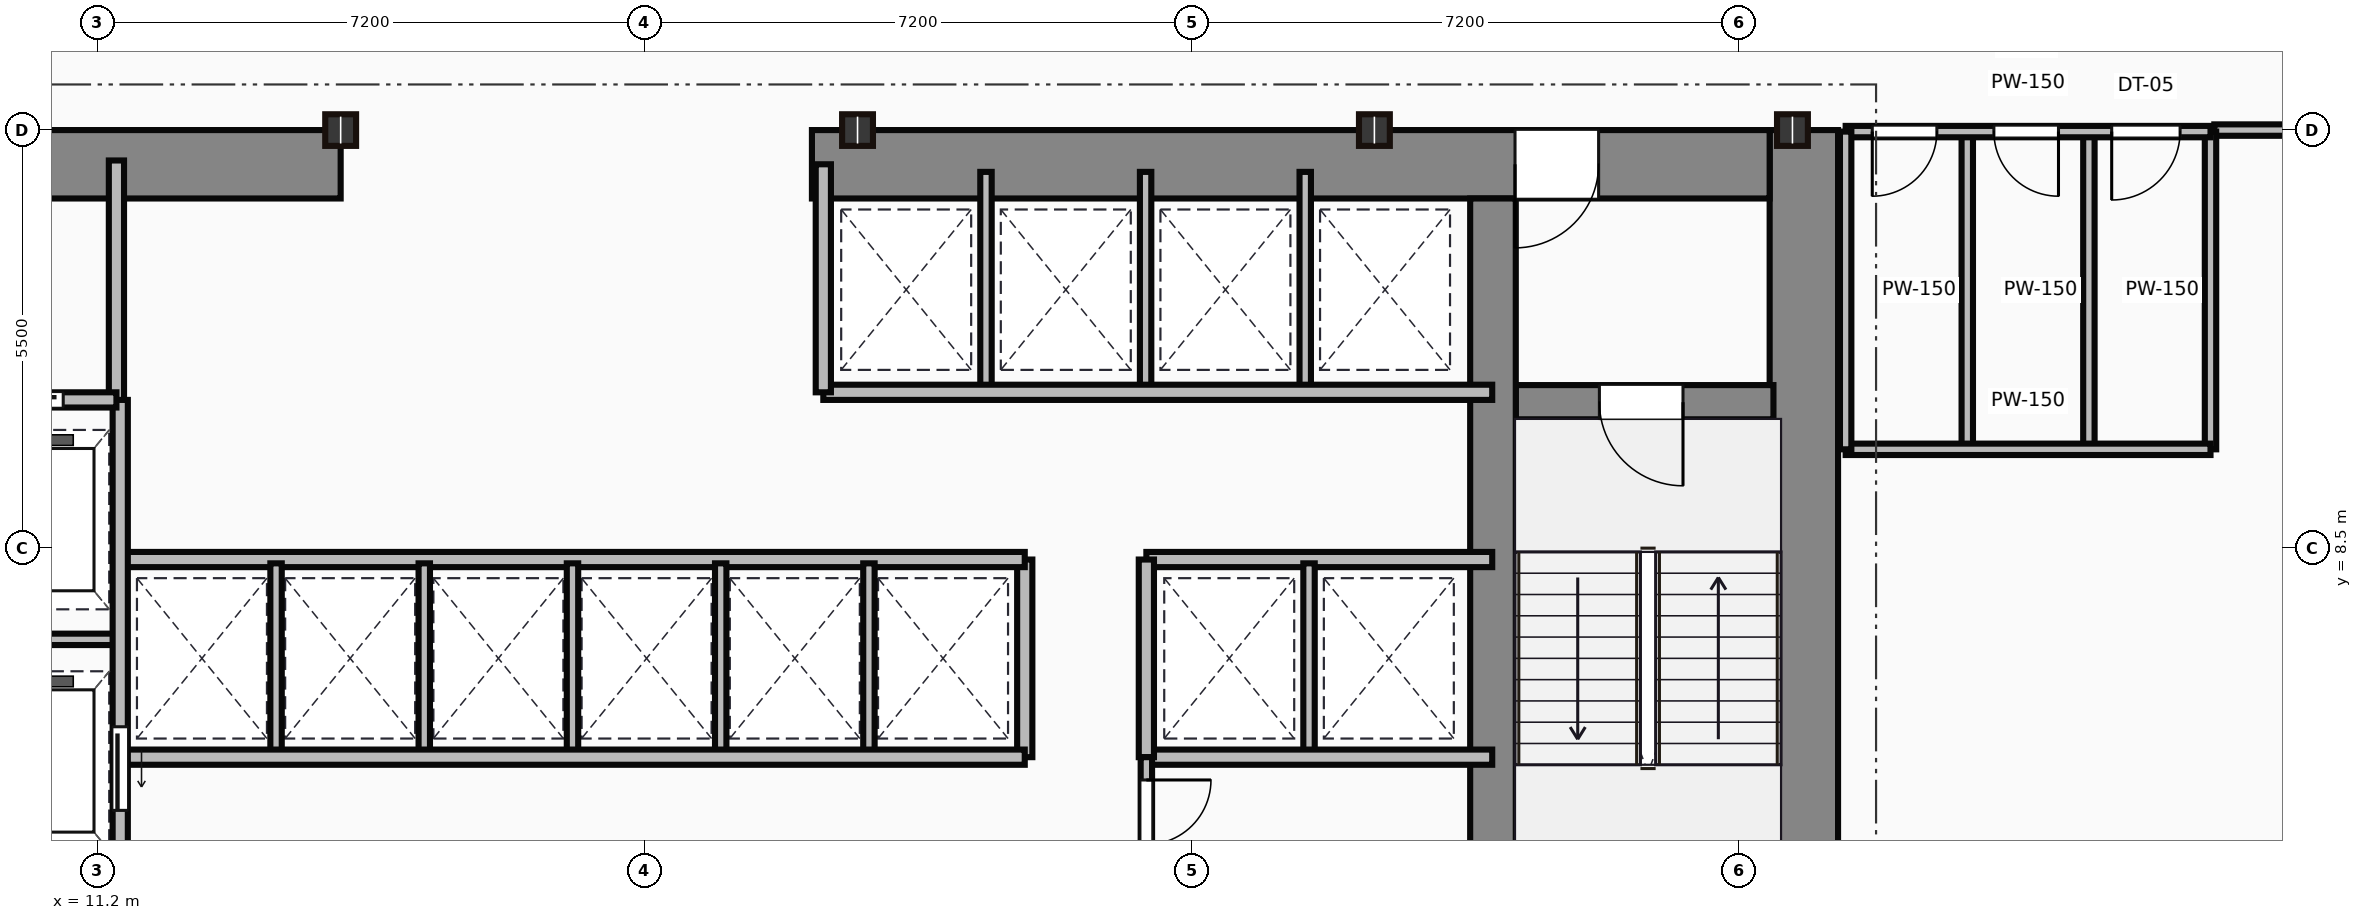
"""IFC4 building model, lengths in metres.
Left out: names, types, materials, properties, quantities, classifications, styles, units other than length and angle.
Written with IfcOpenShell. Run it as: python <this file> out.ifc"""

import sys

from ifc_helpers import new_model, si_unit, direction, frame, frame_2d, origin, origin_2d, place, context, subcontext, project, spatial, rectangle, i_section, extrude, source, transform, mapped, element, fill, save


model = new_model("IFC4")
c1 = context("Model", 3, precision=1e-05, world=origin(), true_north=direction((0.0, 1.0)))
c2 = subcontext(c1, "Body", "Model", "MODEL_VIEW")
j1 = project(units=[si_unit("LENGTHUNIT", "METRE"), si_unit("PLANEANGLEUNIT", "RADIAN")], contexts=[c1])
p1 = place(None, origin())
s1 = spatial("IfcSite", under=j1, at=p1, CompositionType="ELEMENT")
p2 = place(p1, origin())
s2 = spatial("IfcBuilding", under=s1, at=p2, CompositionType="ELEMENT")
p3 = place(p2, frame((0.0, 0.0, 43.45)))
s3 = spatial("IfcBuildingStorey", under=s2, at=p3, CompositionType="ELEMENT", Elevation=43.45)
m1 = source(origin(), c2, "Body", "SweptSolid", [
    extrude(rectangle(XDim=13.1, YDim=0.9, at=frame_2d((6.55, 0.0))), origin(), (0.0, 0.0, 1.0), 3.65),
])
p4 = place(p3, frame((33.65, 0.9, 0.0), z_axis=(0.0, 0.0, 1.0), x_axis=(0.0, 1.0, 0.0)))
e1 = element("IfcWall", 1, at=p4, inside=s3, PredefinedType="SHEAR", context=c2, shape_type="MappedRepresentation", body=[
    mapped(m1, transform((0.0, 0.0, 0.0))),
])
m2 = source(origin(), c2, "Body", "SweptSolid", [
    extrude(rectangle(XDim=9.1, YDim=0.9, at=frame_2d((4.55, 0.0))), origin(), (0.0, 0.0, 1.0), 3.65),
])
p5 = place(p3, frame((5.3, 13.55, 0.0), z_axis=(0.0, 0.0, 1.0), x_axis=(1.0, 0.0, 0.0)))
e2 = element("IfcWall", 2, at=p5, inside=s3, PredefinedType="SHEAR", context=c2, shape_type="MappedRepresentation", body=[
    mapped(m2, transform((0.0, 0.0, 0.0))),
])
p6 = place(p5, frame((4.1, 0.0, 0.0)))
e3 = element("IfcOpeningElement", 3, at=p6, cuts=e2, PredefinedType="OPENING", context=c2, shape_type="SweptSolid", body=[
    extrude(rectangle(XDim=1.1, YDim=2.15, at=frame_2d((0.55, 1.075))), frame((0.0, 0.46, 0.0), z_axis=(0.0, -1.0, 0.0), x_axis=(1.0, 0.0, 0.0)), (0.0, 0.0, 1.0), 0.92),
])
m3 = source(origin(), c2, "Body", "SweptSolid", [
    extrude(rectangle(XDim=12.6, YDim=0.9, at=frame_2d((6.3, 0.0))), origin(), (0.0, 0.0, 1.0), 3.65),
])
p7 = place(p3, frame((20.6, 13.55, 0.0), z_axis=(0.0, 0.0, 1.0), x_axis=(1.0, 0.0, 0.0)))
e4 = element("IfcWall", 4, at=p7, inside=s3, PredefinedType="SHEAR", context=c2, shape_type="MappedRepresentation", body=[
    mapped(m3, transform((0.0, 0.0, 0.0))),
])
p8 = place(p7, frame((9.25, 0.0, 0.0)))
e5 = element("IfcOpeningElement", 5, at=p8, cuts=e4, PredefinedType="OPENING", context=c2, shape_type="SweptSolid", body=[
    extrude(rectangle(XDim=1.1, YDim=2.15, at=frame_2d((0.55, 1.075))), frame((0.0, 0.46, 0.0), z_axis=(0.0, -1.0, 0.0), x_axis=(1.0, 0.0, 0.0)), (0.0, 0.0, 1.0), 0.92),
])
m4 = source(origin(), c2, "Body", "SweptSolid", [
    extrude(rectangle(XDim=12.2, YDim=0.6, at=frame_2d((6.1, 0.0))), origin(), (0.0, 0.0, 1.0), 3.65),
])
p9 = place(p3, frame((29.56, 0.9, 0.0), z_axis=(0.0, 0.0, 1.0), x_axis=(0.0, 1.0, 0.0)))
e6 = element("IfcWall", 6, at=p9, inside=s3, PredefinedType="SHEAR", context=c2, shape_type="MappedRepresentation", body=[
    mapped(m4, transform((0.0, 0.0, 0.0))),
])
m5 = source(origin(), c2, "Body", "SweptSolid", [
    extrude(rectangle(XDim=3.39, YDim=0.45, at=frame_2d((1.695, 0.0))), origin(), (0.0, 0.0, 1.0), 3.65),
])
p10 = place(p3, frame((29.86, 10.42, 0.0), z_axis=(0.0, 0.0, 1.0), x_axis=(1.0, 0.0, 0.0)))
e7 = element("IfcWall", 7, at=p10, inside=s3, PredefinedType="SHEAR", context=c2, shape_type="MappedRepresentation", body=[
    mapped(m5, transform((0.0, 0.0, 0.0))),
])
p11 = place(p10, frame((1.1, 0.0, 0.0)))
e8 = element("IfcOpeningElement", 8, at=p11, cuts=e7, PredefinedType="OPENING", context=c2, shape_type="SweptSolid", body=[
    extrude(rectangle(XDim=1.1, YDim=2.15, at=frame_2d((0.55, 1.075))), frame((0.0, 0.235, 0.0), z_axis=(0.0, -1.0, 0.0), x_axis=(1.0, 0.0, 0.0)), (0.0, 0.0, 1.0), 0.47),
])
m6 = source(origin(), c2, "Body", "SweptSolid", [
    extrude(i_section(OverallWidth=0.406, OverallDepth=0.416, WebThickness=0.03, FlangeThickness=0.048, at=origin_2d()), origin(), (0.0, 0.0, 1.0), 3.65),
])
for number, where, z_axis, x_axis in (
    (9, (14.4, 14.0, 0.0), (0.0, 0.0, 1.0), (1.0, 0.0, 0.0)),
    (10, (21.2, 14.0, 0.0), (0.0, 0.0, 1.0), (1.0, 0.0, 0.0)),
    (11, (28.0, 14.0, 0.0), (0.0, 0.0, 1.0), (1.0, 0.0, 0.0)),
    (12, (33.5, 14.0, 0.0), (0.0, 0.0, 1.0), (1.0, 0.0, 0.0)),
):
    element("IfcColumn", number, at=place(p3, frame(where, z_axis=z_axis, x_axis=x_axis)), inside=s3, PredefinedType="COLUMN", context=c2, shape_type="MappedRepresentation", body=[
        mapped(m6, transform((0.0, 0.0, 0.0))),
    ])
m7 = source(origin(), c2, "Body", "SweptSolid", [
    extrude(rectangle(XDim=3.18, YDim=0.2, at=frame_2d((1.59, 0.0))), origin(), (0.0, 0.0, 1.0), 3.4),
])
p12 = place(p3, frame((11.45, 10.42, 0.0), z_axis=(0.0, 0.0, 1.0), x_axis=(0.0, 1.0, 0.0)))
e13 = element("IfcWall", 13, at=p12, inside=s3, PredefinedType="PARTITIONING", context=c2, shape_type="MappedRepresentation", body=[
    mapped(m7, transform((0.0, 0.0, 0.0))),
])
m8 = source(origin(), c2, "Body", "SweptSolid", [
    extrude(rectangle(XDim=2.35, YDim=0.2, at=frame_2d((1.175, 0.0))), origin(), (0.0, 0.0, 1.0), 3.4),
])
p13 = place(p3, frame((9.1, 10.45, 0.0), z_axis=(0.0, 0.0, 1.0), x_axis=(1.0, 0.0, 0.0)))
e14 = element("IfcWall", 14, at=p13, inside=s3, PredefinedType="PARTITIONING", context=c2, shape_type="MappedRepresentation", body=[
    mapped(m8, transform((0.0, 0.0, 0.0))),
])
p14 = place(p13, frame((0.55, 0.0, 0.0)))
e15 = element("IfcOpeningElement", 15, at=p14, cuts=e14, PredefinedType="OPENING", context=c2, shape_type="SweptSolid", body=[
    extrude(rectangle(XDim=1.1, YDim=2.15, at=frame_2d((0.55, 1.075))), frame((0.0, 0.11, 0.0), z_axis=(0.0, -1.0, 0.0), x_axis=(1.0, 0.0, 0.0)), (0.0, 0.0, 1.0), 0.22),
])
m9 = source(origin(), c2, "Body", "SweptSolid", [
    extrude(rectangle(XDim=9.6, YDim=0.2, at=frame_2d((4.8, 0.0))), origin(), (0.0, 0.0, 1.0), 3.4),
])
p15 = place(p3, frame((11.5, 0.85, 0.0), z_axis=(0.0, 0.0, 1.0), x_axis=(0.0, 1.0, 0.0)))
e16 = element("IfcWall", 16, at=p15, inside=s3, PredefinedType="PARTITIONING", context=c2, shape_type="MappedRepresentation", body=[
    mapped(m9, transform((0.0, 0.0, 0.0))),
])
p16 = place(p15, frame((4.2, 0.0, 0.0)))
e17 = element("IfcOpeningElement", 17, at=p16, cuts=e16, PredefinedType="OPENING", context=c2, shape_type="SweptSolid", body=[
    extrude(rectangle(XDim=1.1, YDim=2.15, at=frame_2d((0.55, 1.075))), frame((0.0, 0.11, 0.0), z_axis=(0.0, -1.0, 0.0), x_axis=(1.0, 0.0, 0.0)), (0.0, 0.0, 1.0), 0.22),
])
p17 = place(p15, frame((0.9, 0.0, 0.0)))
e18 = element("IfcOpeningElement", 18, at=p17, cuts=e16, PredefinedType="OPENING", context=c2, shape_type="SweptSolid", body=[
    extrude(rectangle(XDim=1.2, YDim=2.15, at=frame_2d((0.6, 1.075))), frame((0.0, 0.11, 0.0), z_axis=(0.0, -1.0, 0.0), x_axis=(1.0, 0.0, 0.0)), (0.0, 0.0, 1.0), 0.22),
])
m10 = source(origin(), c2, "Body", "SweptSolid", [
    extrude(rectangle(XDim=2.4, YDim=0.15, at=frame_2d((1.2, 0.0))), origin(), (0.0, 0.0, 1.0), 3.4),
])
p18 = place(p3, frame((9.1, 7.3, 0.0), z_axis=(0.0, 0.0, 1.0), x_axis=(1.0, 0.0, 0.0)))
e19 = element("IfcWall", 19, at=p18, inside=s3, PredefinedType="PARTITIONING", context=c2, shape_type="MappedRepresentation", body=[
    mapped(m10, transform((0.0, 0.0, 0.0))),
])
m11 = source(origin(), c2, "Body", "SweptSolid", [
    extrude(rectangle(XDim=11.85, YDim=0.2, at=frame_2d((5.925, 0.0))), origin(), (0.0, 0.0, 1.0), 3.4),
])
for number, where, z_axis, x_axis in (
    (20, (11.55, 5.75, 0.0), (0.0, 0.0, 1.0), (1.0, 0.0, 0.0)),
    (21, (11.55, 8.35, 0.0), (0.0, 0.0, 1.0), (1.0, 0.0, 0.0)),
):
    element("IfcWall", number, at=place(p3, frame(where, z_axis=z_axis, x_axis=x_axis)), inside=s3, PredefinedType="PARTITIONING", context=c2, shape_type="MappedRepresentation", body=[
        mapped(m11, transform((0.0, 0.0, 0.0))),
    ])
m12 = source(origin(), c2, "Body", "SweptSolid", [
    extrude(rectangle(XDim=2.6, YDim=0.2, at=frame_2d((1.3, 0.0))), origin(), (0.0, 0.0, 1.0), 3.4),
])
p19 = place(p3, frame((23.4, 5.75, 0.0), z_axis=(0.0, 0.0, 1.0), x_axis=(0.0, 1.0, 0.0)))
e22 = element("IfcWall", 22, at=p19, inside=s3, PredefinedType="PARTITIONING", context=c2, shape_type="MappedRepresentation", body=[
    mapped(m12, transform((0.0, 0.0, 0.0))),
])
m13 = source(origin(), c2, "Body", "SweptSolid", [
    extrude(rectangle(XDim=2.5, YDim=0.15, at=frame_2d((1.25, 0.0))), origin(), (0.0, 0.0, 1.0), 3.4),
])
for number, where, z_axis, x_axis in (
    (23, (13.55, 5.8, 0.0), (0.0, 0.0, 1.0), (0.0, 1.0, 0.0)),
    (24, (15.5, 5.8, 0.0), (0.0, 0.0, 1.0), (0.0, 1.0, 0.0)),
    (25, (17.45, 5.8, 0.0), (0.0, 0.0, 1.0), (0.0, 1.0, 0.0)),
    (26, (19.4, 5.8, 0.0), (0.0, 0.0, 1.0), (0.0, 1.0, 0.0)),
    (27, (21.35, 5.8, 0.0), (0.0, 0.0, 1.0), (0.0, 1.0, 0.0)),
):
    element("IfcWall", number, at=place(p3, frame(where, z_axis=z_axis, x_axis=x_axis)), inside=s3, PredefinedType="PARTITIONING", context=c2, shape_type="MappedRepresentation", body=[
        mapped(m13, transform((0.0, 0.0, 0.0))),
    ])
m14 = source(origin(), c2, "Body", "SweptSolid", [
    extrude(rectangle(XDim=8.8, YDim=0.2, at=frame_2d((4.4, 0.0))), origin(), (0.0, 0.0, 1.0), 3.4),
])
p20 = place(p3, frame((20.75, 10.55, 0.0), z_axis=(0.0, 0.0, 1.0), x_axis=(1.0, 0.0, 0.0)))
e28 = element("IfcWall", 28, at=p20, inside=s3, PredefinedType="PARTITIONING", context=c2, shape_type="MappedRepresentation", body=[
    mapped(m14, transform((0.0, 0.0, 0.0))),
])
m15 = source(origin(), c2, "Body", "SweptSolid", [
    extrude(rectangle(XDim=3.0, YDim=0.2, at=frame_2d((1.5, 0.0))), origin(), (0.0, 0.0, 1.0), 3.4),
])
p21 = place(p3, frame((20.75, 10.55, 0.0), z_axis=(0.0, 0.0, 1.0), x_axis=(0.0, 1.0, 0.0)))
e29 = element("IfcWall", 29, at=p21, inside=s3, PredefinedType="PARTITIONING", context=c2, shape_type="MappedRepresentation", body=[
    mapped(m15, transform((0.0, 0.0, 0.0))),
])
m16 = source(origin(), c2, "Body", "SweptSolid", [
    extrude(rectangle(XDim=2.85, YDim=0.15, at=frame_2d((1.425, 0.0))), origin(), (0.0, 0.0, 1.0), 3.4),
])
for number, where, z_axis, x_axis in (
    (30, (22.89, 10.6, 0.0), (0.0, 0.0, 1.0), (0.0, 1.0, 0.0)),
    (31, (24.99, 10.6, 0.0), (0.0, 0.0, 1.0), (0.0, 1.0, 0.0)),
    (32, (27.09, 10.6, 0.0), (0.0, 0.0, 1.0), (0.0, 1.0, 0.0)),
):
    element("IfcWall", number, at=place(p3, frame(where, z_axis=z_axis, x_axis=x_axis)), inside=s3, PredefinedType="PARTITIONING", context=c2, shape_type="MappedRepresentation", body=[
        mapped(m16, transform((0.0, 0.0, 0.0))),
    ])
m17 = source(origin(), c2, "Body", "SweptSolid", [
    extrude(rectangle(XDim=4.55, YDim=0.2, at=frame_2d((2.275, 0.0))), origin(), (0.0, 0.0, 1.0), 3.4),
])
for number, where, z_axis, x_axis in (
    (33, (25.0, 8.35, 0.0), (0.0, 0.0, 1.0), (1.0, 0.0, 0.0)),
    (34, (25.0, 5.75, 0.0), (0.0, 0.0, 1.0), (1.0, 0.0, 0.0)),
):
    element("IfcWall", number, at=place(p3, frame(where, z_axis=z_axis, x_axis=x_axis)), inside=s3, PredefinedType="PARTITIONING", context=c2, shape_type="MappedRepresentation", body=[
        mapped(m17, transform((0.0, 0.0, 0.0))),
    ])
p22 = place(p3, frame((25.0, 5.75, 0.0), z_axis=(0.0, 0.0, 1.0), x_axis=(0.0, 1.0, 0.0)))
e35 = element("IfcWall", 35, at=p22, inside=s3, PredefinedType="PARTITIONING", context=c2, shape_type="MappedRepresentation", body=[
    mapped(m12, transform((0.0, 0.0, 0.0))),
])
p23 = place(p3, frame((27.14, 5.8, 0.0), z_axis=(0.0, 0.0, 1.0), x_axis=(0.0, 1.0, 0.0)))
e36 = element("IfcWall", 36, at=p23, inside=s3, PredefinedType="PARTITIONING", context=c2, shape_type="MappedRepresentation", body=[
    mapped(m13, transform((0.0, 0.0, 0.0))),
])
m18 = source(origin(), c2, "Body", "SweptSolid", [
    extrude(rectangle(XDim=4.9, YDim=0.15, at=frame_2d((2.45, 0.0))), origin(), (0.0, 0.0, 1.0), 3.4),
])
p24 = place(p3, frame((25.0, 0.85, 0.0), z_axis=(0.0, 0.0, 1.0), x_axis=(0.0, 1.0, 0.0)))
e37 = element("IfcWall", 37, at=p24, inside=s3, PredefinedType="PARTITIONING", context=c2, shape_type="MappedRepresentation", body=[
    mapped(m18, transform((0.0, 0.0, 0.0))),
])
p25 = place(p24, frame((2.0, 0.0, 0.0)))
e38 = element("IfcOpeningElement", 38, at=p25, cuts=e37, PredefinedType="OPENING", context=c2, shape_type="SweptSolid", body=[
    extrude(rectangle(XDim=0.95, YDim=2.15, at=frame_2d((0.475, 1.075))), frame((0.0, 0.085, 0.0), z_axis=(0.0, -1.0, 0.0), x_axis=(1.0, 0.0, 0.0)), (0.0, 0.0, 1.0), 0.17),
])
p26 = place(p24, frame((3.75, 0.0, 0.0)))
e39 = element("IfcOpeningElement", 39, at=p26, cuts=e37, PredefinedType="OPENING", context=c2, shape_type="SweptSolid", body=[
    extrude(rectangle(XDim=0.85, YDim=2.15, at=frame_2d((0.425, 1.075))), frame((0.0, 0.085, 0.0), z_axis=(0.0, -1.0, 0.0), x_axis=(1.0, 0.0, 0.0)), (0.0, 0.0, 1.0), 0.17),
])
m19 = source(origin(), c2, "Body", "SweptSolid", [
    extrude(rectangle(XDim=4.8, YDim=0.15, at=frame_2d((2.4, 0.0))), origin(), (0.0, 0.0, 1.0), 2.625),
])
p27 = place(p3, frame((34.2, 13.98, 0.0), z_axis=(0.0, 0.0, 1.0), x_axis=(1.0, 0.0, 0.0)))
e40 = element("IfcWall", 40, at=p27, inside=s3, PredefinedType="PARTITIONING", context=c2, shape_type="MappedRepresentation", body=[
    mapped(m19, transform((0.0, 0.0, 0.0))),
])
p28 = place(p27, frame((0.35, 0.0, 0.0)))
e41 = element("IfcOpeningElement", 41, at=p28, cuts=e40, PredefinedType="OPENING", context=c2, shape_type="SweptSolid", body=[
    extrude(rectangle(XDim=0.85, YDim=2.1, at=frame_2d((0.425, 1.05))), frame((0.0, 0.085, 0.0), z_axis=(0.0, -1.0, 0.0), x_axis=(1.0, 0.0, 0.0)), (0.0, 0.0, 1.0), 0.17),
])
p29 = place(p27, frame((1.95, 0.0, 0.0)))
e42 = element("IfcOpeningElement", 42, at=p29, cuts=e40, PredefinedType="OPENING", context=c2, shape_type="SweptSolid", body=[
    extrude(rectangle(XDim=0.85, YDim=2.1, at=frame_2d((0.425, 1.05))), frame((0.0, 0.085, 0.0), z_axis=(0.0, -1.0, 0.0), x_axis=(1.0, 0.0, 0.0)), (0.0, 0.0, 1.0), 0.17),
])
p30 = place(p27, frame((3.5, 0.0, 0.0)))
e43 = element("IfcOpeningElement", 43, at=p30, cuts=e40, PredefinedType="OPENING", context=c2, shape_type="SweptSolid", body=[
    extrude(rectangle(XDim=0.9, YDim=2.1, at=frame_2d((0.45, 1.05))), frame((0.0, 0.085, 0.0), z_axis=(0.0, -1.0, 0.0), x_axis=(1.0, 0.0, 0.0)), (0.0, 0.0, 1.0), 0.17),
])
m20 = source(origin(), c2, "Body", "SweptSolid", [
    extrude(rectangle(XDim=4.8, YDim=0.15, at=frame_2d((2.4, 0.0))), origin(), (0.0, 0.0, 1.0), 3.4),
])
p31 = place(p3, frame((34.2, 9.8, 0.0), z_axis=(0.0, 0.0, 1.0), x_axis=(1.0, 0.0, 0.0)))
e44 = element("IfcWall", 44, at=p31, inside=s3, PredefinedType="PARTITIONING", context=c2, shape_type="MappedRepresentation", body=[
    mapped(m20, transform((0.0, 0.0, 0.0))),
])
m21 = source(origin(), c2, "Body", "SweptSolid", [
    extrude(rectangle(XDim=4.18, YDim=0.15, at=frame_2d((2.09, 0.0))), origin(), (0.0, 0.0, 1.0), 3.4),
])
for number, where, z_axis, x_axis in (
    (45, (39.0, 9.8, 0.0), (0.0, 0.0, 1.0), (0.0, 1.0, 0.0)),
    (46, (34.2, 9.8, 0.0), (0.0, 0.0, 1.0), (0.0, 1.0, 0.0)),
    (47, (35.8, 9.8, 0.0), (0.0, 0.0, 1.0), (0.0, 1.0, 0.0)),
    (48, (37.4, 9.8, 0.0), (0.0, 0.0, 1.0), (0.0, 1.0, 0.0)),
):
    element("IfcWall", number, at=place(p3, frame(where, z_axis=z_axis, x_axis=x_axis)), inside=s3, PredefinedType="PARTITIONING", context=c2, shape_type="MappedRepresentation", body=[
        mapped(m21, transform((0.0, 0.0, 0.0))),
    ])
m22 = source(origin(), c2, "Body", "SweptSolid", [
    extrude(rectangle(XDim=7.75, YDim=0.15, at=frame_2d((3.875, 0.0))), origin(), (0.0, 0.0, 1.0), 2.625),
])
p32 = place(p3, frame((46.8, 14.0, 0.0), z_axis=(0.0, 0.0, 1.0), x_axis=(-1.0, 0.0, 0.0)))
e49 = element("IfcWall", 49, at=p32, inside=s3, PredefinedType="PARTITIONING", context=c2, shape_type="MappedRepresentation", body=[
    mapped(m22, transform((0.0, 0.0, 0.0))),
])
m23 = source(origin(), c2, "Body", "SweptSolid", [
    extrude(rectangle(XDim=1.1, YDim=2.15, at=frame_2d((0.55, 1.075))), frame((0.0, 0.025, 0.0), z_axis=(0.0, -1.0, 0.0), x_axis=(1.0, 0.0, 0.0)), (0.0, 0.0, 1.0), 0.05),
])
p33 = place(p11, frame((1.1, 0.0, 0.0), z_axis=(0.0, 0.0, 1.0), x_axis=(-1.0, 0.0, 0.0)))
e50 = element("IfcDoor", 50, at=p33, inside=s3, OperationType="SINGLE_SWING_RIGHT", PredefinedType="DOOR", context=c2, shape_type="MappedRepresentation", body=[
    mapped(m23, transform((0.0, 0.0, 0.0))),
])
fill(e8, e50)
p34 = place(p8, origin())
e51 = element("IfcDoor", 51, at=p34, inside=s3, OperationType="SINGLE_SWING_LEFT", PredefinedType="DOOR", context=c2, shape_type="MappedRepresentation", body=[
    mapped(m23, transform((0.0, 0.0, 0.0))),
])
fill(e5, e51)
p35 = place(p14, origin())
e52 = element("IfcDoor", 52, at=p35, inside=s3, OperationType="SLIDING_TO_LEFT", PredefinedType="DOOR", context=c2, shape_type="MappedRepresentation", body=[
    mapped(m23, transform((0.0, 0.0, 0.0))),
])
fill(e15, e52)
p36 = place(p16, frame((1.1, 0.0, 0.0), z_axis=(0.0, 0.0, 1.0), x_axis=(-1.0, 0.0, 0.0)))
e53 = element("IfcDoor", 53, at=p36, inside=s3, OperationType="SLIDING_TO_LEFT", PredefinedType="DOOR", context=c2, shape_type="MappedRepresentation", body=[
    mapped(m23, transform((0.0, 0.0, 0.0))),
])
fill(e17, e53)
m24 = source(origin(), c2, "Body", "SweptSolid", [
    extrude(rectangle(XDim=0.85, YDim=2.15, at=frame_2d((0.425, 1.075))), frame((0.0, 0.025, 0.0), z_axis=(0.0, -1.0, 0.0), x_axis=(1.0, 0.0, 0.0)), (0.0, 0.0, 1.0), 0.05),
])
p37 = place(p26, origin())
e54 = element("IfcDoor", 54, at=p37, inside=s3, OperationType="SINGLE_SWING_RIGHT", PredefinedType="DOOR", context=c2, shape_type="MappedRepresentation", body=[
    mapped(m24, transform((0.0, 0.0, 0.0))),
])
fill(e39, e54)
m25 = source(origin(), c2, "Body", "SweptSolid", [
    extrude(rectangle(XDim=0.85, YDim=2.1, at=frame_2d((0.425, 1.05))), frame((0.0, 0.025, 0.0), z_axis=(0.0, -1.0, 0.0), x_axis=(1.0, 0.0, 0.0)), (0.0, 0.0, 1.0), 0.05),
])
p38 = place(p28, frame((0.85, 0.0, 0.0), z_axis=(0.0, 0.0, 1.0), x_axis=(-1.0, 0.0, 0.0)))
e55 = element("IfcDoor", 55, at=p38, inside=s3, OperationType="SINGLE_SWING_LEFT", PredefinedType="DOOR", context=c2, shape_type="MappedRepresentation", body=[
    mapped(m25, transform((0.0, 0.0, 0.0))),
])
fill(e41, e55)
p39 = place(p29, frame((0.85, 0.0, 0.0), z_axis=(0.0, 0.0, 1.0), x_axis=(-1.0, 0.0, 0.0)))
e56 = element("IfcDoor", 56, at=p39, inside=s3, OperationType="SINGLE_SWING_RIGHT", PredefinedType="DOOR", context=c2, shape_type="MappedRepresentation", body=[
    mapped(m25, transform((0.0, 0.0, 0.0))),
])
fill(e42, e56)
m26 = source(origin(), c2, "Body", "SweptSolid", [
    extrude(rectangle(XDim=0.9, YDim=2.1, at=frame_2d((0.45, 1.05))), frame((0.0, 0.025, 0.0), z_axis=(0.0, -1.0, 0.0), x_axis=(1.0, 0.0, 0.0)), (0.0, 0.0, 1.0), 0.05),
])
p40 = place(p30, frame((0.9, 0.0, 0.0), z_axis=(0.0, 0.0, 1.0), x_axis=(-1.0, 0.0, 0.0)))
e57 = element("IfcDoor", 57, at=p40, inside=s3, OperationType="SINGLE_SWING_LEFT", PredefinedType="DOOR", context=c2, shape_type="MappedRepresentation", body=[
    mapped(m26, transform((0.0, 0.0, 0.0))),
])
fill(e43, e57)
save(model, sys.argv[1])
